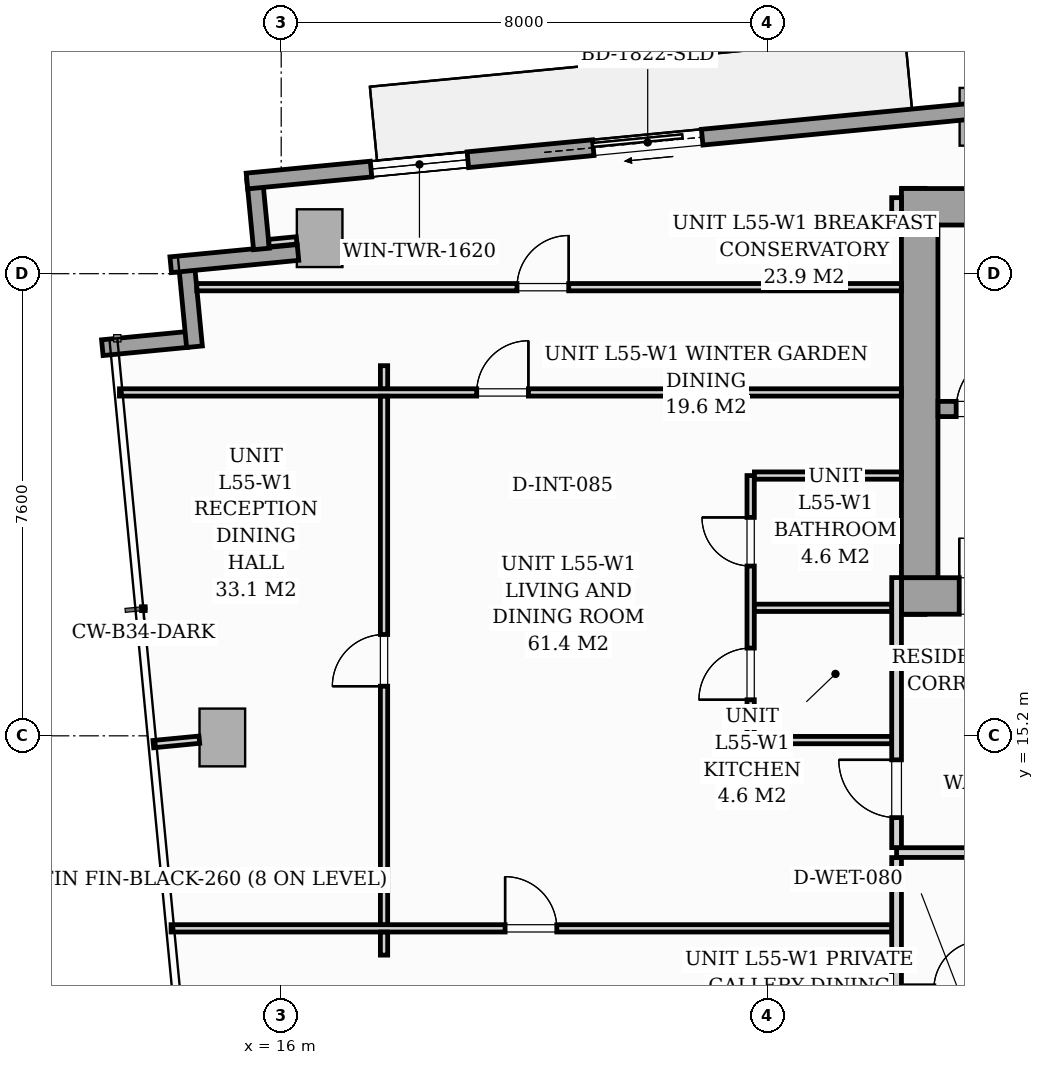
"""IFC4 building model, lengths in metres.
Left out: names, types, materials, properties, quantities, classifications, styles, units other than length and angle.
Written with IfcOpenShell. Run it as: python <this file> out.ifc"""

import sys

from ifc_helpers import new_model, si_unit, direction, frame, frame_2d, origin, origin_2d, place, context, subcontext, project, spatial, rectangle, i_section, extrude, source, transform, mapped, element, fill, save


model = new_model("IFC4")
c1 = context("Model", 3, precision=1e-05, world=origin(), true_north=direction((0.0, 1.0)))
c2 = subcontext(c1, "Body", "Model", "MODEL_VIEW")
j1 = project(units=[si_unit("LENGTHUNIT", "METRE"), si_unit("PLANEANGLEUNIT", "RADIAN")], contexts=[c1])
p1 = place(None, origin())
s1 = spatial("IfcSite", under=j1, at=p1, CompositionType="ELEMENT")
p2 = place(p1, origin())
s2 = spatial("IfcBuilding", under=s1, at=p2, CompositionType="ELEMENT")
p3 = place(p2, frame((0.0, 0.0, 192.2)))
s3 = spatial("IfcBuildingStorey", under=s2, at=p3, CompositionType="ELEMENT", Elevation=192.2)
m1 = source(origin(), c2, "Body", "SweptSolid", [
    extrude(i_section(OverallWidth=0.416, OverallDepth=0.446, WebThickness=0.039, FlangeThickness=0.063, FilletRadius=0.018, at=origin_2d()), origin(), (0.0, 0.0, 1.0), 3.196),
])
for number, where, z_axis, x_axis in (
    (1, (26.4, 17.4, 0.002), (0.0, 0.0, 1.0), (1.0, 0.0, 0.0)),
    (2, (26.4, 24.0, 0.002), (0.0, 0.0, 1.0), (1.0, 0.0, 0.0)),
):
    element("IfcColumn", number, at=place(p3, frame(where, z_axis=z_axis, x_axis=x_axis)), inside=s3, PredefinedType="PILASTER", context=c2, shape_type="MappedRepresentation", body=[
        mapped(m1, transform((0.0, 0.0, 0.0), scale=1.0)),
    ])
m2 = source(origin(), c2, "Body", "SweptSolid", [
    extrude(rectangle(XDim=0.75, YDim=0.95, at=origin_2d()), origin(), (0.0, 0.0, 1.0), 3.196),
])
for number, where, z_axis, x_axis in (
    (3, (16.632, 23.384, 0.002), (0.0, 0.0, 1.0), (0.995, 0.096, 0.0)),
    (4, (27.532, 25.38, 0.002), (0.0, 0.0, 1.0), (0.995, 0.096, 0.0)),
    (5, (15.032, 15.173, 0.002), (0.0, 0.0, 1.0), (0.995, 0.096, 0.0)),
):
    element("IfcColumn", number, at=place(p3, frame(where, z_axis=z_axis, x_axis=x_axis)), inside=s3, PredefinedType="COLUMN", context=c2, shape_type="MappedRepresentation", body=[
        mapped(m2, transform((0.0, 0.0, 0.0), scale=1.0)),
    ])
p4 = place(p3, frame((13.058, 21.583, 0.0), z_axis=(0.0, 0.0, 1.0), x_axis=(0.99540774648, 0.095725744959, 0.0)))
e6 = element("IfcWall", 6, at=p4, inside=s3, PredefinedType="STANDARD", context=c2, shape_type="SweptSolid", body=[
    extrude(rectangle(XDim=1.395, YDim=0.26, at=frame_2d((0.698, 0.0))), origin(), (0.0, 0.0, 1.0), 2.94),
])
p5 = place(p3, frame((14.574, 21.599, 0.0), z_axis=(0.0, 0.0, 1.0), x_axis=(-0.095742423056, 0.99540614245, 0.0)))
e7 = element("IfcWall", 7, at=p5, inside=s3, PredefinedType="STANDARD", context=c2, shape_type="SweptSolid", body=[
    extrude(rectangle(XDim=1.395, YDim=0.26, at=frame_2d((0.697, 0.0))), origin(), (0.0, 0.0, 1.0), 2.94),
])
p6 = place(p3, frame((14.183, 22.947, 0.0), z_axis=(0.0, 0.0, 1.0), x_axis=(0.995401580483, 0.095789840651, 0.0)))
e8 = element("IfcWall", 8, at=p6, inside=s3, PredefinedType="STANDARD", context=c2, shape_type="SweptSolid", body=[
    extrude(rectangle(XDim=2.103, YDim=0.26, at=frame_2d((1.051, 0.0))), origin(), (0.0, 0.0, 1.0), 2.94),
])
p7 = place(p3, frame((15.675, 23.207, 0.0), z_axis=(0.0, 0.0, 1.0), x_axis=(-0.095951054827, 0.995386053287, 0.0)))
e9 = element("IfcWall", 9, at=p7, inside=s3, PredefinedType="STANDARD", context=c2, shape_type="SweptSolid", body=[
    extrude(rectangle(XDim=1.15, YDim=0.26, at=frame_2d((0.575, 0.0))), origin(), (0.0, 0.0, 1.0), 2.94),
])
p8 = place(p3, frame((15.437, 24.324, 0.0), z_axis=(0.0, 0.0, 1.0), x_axis=(0.995395627913, 0.095851676732, 0.0)))
e10 = element("IfcWall", 10, at=p8, inside=s3, PredefinedType="STANDARD", context=c2, shape_type="SweptSolid", body=[
    extrude(rectangle(XDim=16.1, YDim=0.26, at=frame_2d((8.05, 0.0))), origin(), (0.0, 0.0, 1.0), 2.94),
])
p9 = place(p8, frame((5.721, 0.0, 0.0)))
e11 = element("IfcOpeningElement", 11, at=p9, cuts=e10, PredefinedType="OPENING", context=c2, shape_type="SweptSolid", body=[
    extrude(rectangle(XDim=1.8, YDim=2.06, at=frame_2d((0.9, 1.03))), frame((0.0, 0.14, 0.0), z_axis=(0.0, -1.0, 0.0), x_axis=(1.0, 0.0, 0.0)), (0.0, 0.0, 1.0), 0.28),
])
p10 = place(p8, frame((2.05, 0.0, 0.65)))
e12 = element("IfcOpeningElement", 12, at=p10, cuts=e10, PredefinedType="OPENING", context=c2, shape_type="SweptSolid", body=[
    extrude(rectangle(XDim=1.6, YDim=1.5, at=frame_2d((0.8, 0.75))), frame((0.0, 0.14, 0.0), z_axis=(0.0, -1.0, 0.0), x_axis=(1.0, 0.0, 0.0)), (0.0, 0.0, 1.0), 0.28),
])
p11 = place(p3, frame((26.2, 17.5, 0.0), z_axis=(0.0, 0.0, 1.0), x_axis=(1.0, 0.0, 0.0)))
e13 = element("IfcWall", 13, at=p11, inside=s3, PredefinedType="SHEAR", context=c2, shape_type="SweptSolid", body=[
    extrude(rectangle(XDim=19.6, YDim=0.6, at=frame_2d((9.8, 0.0))), origin(), (0.0, 0.0, 1.0), 3.2),
])
p12 = place(p11, frame((0.95, 0.0, 0.0)))
e14 = element("IfcOpeningElement", 14, at=p12, cuts=e13, PredefinedType="OPENING", context=c2, shape_type="SweptSolid", body=[
    extrude(rectangle(XDim=0.95, YDim=2.06, at=frame_2d((0.475, 1.03))), frame((0.0, 0.31, 0.0), z_axis=(0.0, -1.0, 0.0), x_axis=(1.0, 0.0, 0.0)), (0.0, 0.0, 1.0), 0.62),
])
p13 = place(p11, frame((9.38, 0.0, 0.0)))
e15 = element("IfcOpeningElement", 15, at=p13, cuts=e13, PredefinedType="OPENING", context=c2, shape_type="SweptSolid", body=[
    extrude(rectangle(XDim=0.85, YDim=2.0, at=frame_2d((0.425, 1.0))), frame((0.0, 0.31, 0.0), z_axis=(0.0, -1.0, 0.0), x_axis=(1.0, 0.0, 0.0)), (0.0, 0.0, 1.0), 0.62),
])
p14 = place(p11, frame((17.55, 0.0, 0.0)))
e16 = element("IfcOpeningElement", 16, at=p14, cuts=e13, PredefinedType="OPENING", context=c2, shape_type="SweptSolid", body=[
    extrude(rectangle(XDim=0.95, YDim=2.06, at=frame_2d((0.475, 1.03))), frame((0.0, 0.31, 0.0), z_axis=(0.0, -1.0, 0.0), x_axis=(1.0, 0.0, 0.0)), (0.0, 0.0, 1.0), 0.62),
])
p15 = place(p3, frame((26.2, 23.9, 0.0), z_axis=(0.0, 0.0, 1.0), x_axis=(1.0, 0.0, 0.0)))
e17 = element("IfcWall", 17, at=p15, inside=s3, PredefinedType="SHEAR", context=c2, shape_type="SweptSolid", body=[
    extrude(rectangle(XDim=19.6, YDim=0.6, at=frame_2d((9.8, 0.0))), origin(), (0.0, 0.0, 1.0), 3.2),
])
p16 = place(p3, frame((26.5, 17.802, 0.0), z_axis=(0.0, 0.0, 1.0), x_axis=(0.0, 1.0, 0.0)))
e18 = element("IfcWall", 18, at=p16, inside=s3, PredefinedType="SHEAR", context=c2, shape_type="SweptSolid", body=[
    extrude(rectangle(XDim=5.796, YDim=0.6, at=frame_2d((2.898, 0.0))), origin(), (0.0, 0.0, 1.0), 3.2),
])
p17 = place(p3, frame((26.802, 20.575, 0.0), z_axis=(0.0, 0.0, 1.0), x_axis=(1.0, 0.0, 0.0)))
e19 = element("IfcWall", 19, at=p17, inside=s3, PredefinedType="SOLIDWALL", context=c2, shape_type="SweptSolid", body=[
    extrude(rectangle(XDim=8.148, YDim=0.25, at=frame_2d((4.074, 0.0))), origin(), (0.0, 0.0, 1.0), 3.2),
])
p18 = place(p17, frame((0.298, 0.0, 0.0)))
e20 = element("IfcOpeningElement", 20, at=p18, cuts=e19, PredefinedType="OPENING", context=c2, shape_type="SweptSolid", body=[
    extrude(rectangle(XDim=0.95, YDim=2.06, at=frame_2d((0.475, 1.03))), frame((0.0, 0.135, 0.0), z_axis=(0.0, -1.0, 0.0), x_axis=(1.0, 0.0, 0.0)), (0.0, 0.0, 1.0), 0.27),
])
p19 = place(p3, frame((26.12, 13.28, 0.0), z_axis=(0.0, 0.0, 1.0), x_axis=(1.0, 0.0, 0.0)))
e21 = element("IfcWall", 21, at=p19, inside=s3, PredefinedType="PARTITIONING", context=c2, shape_type="SweptSolid", body=[
    extrude(rectangle(XDim=21.33, YDim=0.16, at=frame_2d((10.665, 0.0))), origin(), (0.0, 0.0, 1.0), 2.94),
])
p20 = place(p19, frame((4.704, 0.0, 0.0)))
e22 = element("IfcOpeningElement", 22, at=p20, cuts=e21, PredefinedType="OPENING", context=c2, shape_type="SweptSolid", body=[
    extrude(rectangle(XDim=0.95, YDim=2.06, at=frame_2d((0.475, 1.03))), frame((0.0, 0.09, 0.0), z_axis=(0.0, -1.0, 0.0), x_axis=(1.0, 0.0, 0.0)), (0.0, 0.0, 1.0), 0.18),
])
p21 = place(p19, frame((11.6, 0.0, 0.0)))
e23 = element("IfcOpeningElement", 23, at=p21, cuts=e21, PredefinedType="OPENING", context=c2, shape_type="SweptSolid", body=[
    extrude(rectangle(XDim=0.95, YDim=2.06, at=frame_2d((0.475, 1.03))), frame((0.0, 0.09, 0.0), z_axis=(0.0, -1.0, 0.0), x_axis=(1.0, 0.0, 0.0)), (0.0, 0.0, 1.0), 0.18),
])
p22 = place(p19, frame((14.976, 0.0, 0.0)))
e24 = element("IfcOpeningElement", 24, at=p22, cuts=e21, PredefinedType="OPENING", context=c2, shape_type="SweptSolid", body=[
    extrude(rectangle(XDim=0.95, YDim=2.06, at=frame_2d((0.475, 1.03))), frame((0.0, 0.09, 0.0), z_axis=(0.0, -1.0, 0.0), x_axis=(1.0, 0.0, 0.0)), (0.0, 0.0, 1.0), 0.18),
])
p23 = place(p3, frame((26.12, 7.261, 0.0), z_axis=(0.0, 0.0, 1.0), x_axis=(0.0, 1.0, 0.0)))
e25 = element("IfcWall", 25, at=p23, inside=s3, PredefinedType="PARTITIONING", context=c2, shape_type="SweptSolid", body=[
    extrude(rectangle(XDim=5.937, YDim=0.16, at=frame_2d((2.968, 0.0))), origin(), (0.0, 0.0, 1.0), 2.94),
])
p24 = place(p3, frame((26.12, 13.362, 0.0), z_axis=(0.0, 0.0, 1.0), x_axis=(0.0, 1.0, 0.0)))
e26 = element("IfcWall", 26, at=p24, inside=s3, PredefinedType="PARTITIONING", context=c2, shape_type="SweptSolid", body=[
    extrude(rectangle(XDim=4.44, YDim=0.16, at=frame_2d((2.22, 0.0))), origin(), (0.0, 0.0, 1.0), 2.94),
])
p25 = place(p24, frame((0.493, 0.0, 0.0)))
e27 = element("IfcOpeningElement", 27, at=p25, cuts=e26, PredefinedType="OPENING", context=c2, shape_type="SweptSolid", body=[
    extrude(rectangle(XDim=0.95, YDim=2.06, at=frame_2d((0.475, 1.03))), frame((0.0, 0.09, 0.0), z_axis=(0.0, -1.0, 0.0), x_axis=(1.0, 0.0, 0.0)), (0.0, 0.0, 1.0), 0.18),
])
p26 = place(p3, frame((26.12, 23.598, 0.0), z_axis=(0.0, 0.0, 1.0), x_axis=(0.0, 1.0, 0.0)))
e28 = element("IfcWall", 28, at=p26, inside=s3, PredefinedType="PARTITIONING", context=c2, shape_type="SweptSolid", body=[
    extrude(rectangle(XDim=0.452, YDim=0.16, at=frame_2d((0.226, 0.0))), origin(), (0.0, 0.0, 1.0), 2.94),
])
p27 = place(p3, frame((23.72, 15.13, 0.0), z_axis=(0.0, 0.0, 1.0), x_axis=(0.0, 1.0, 0.0)))
e29 = element("IfcWall", 29, at=p27, inside=s3, PredefinedType="PARTITIONING", context=c2, shape_type="SweptSolid", body=[
    extrude(rectangle(XDim=4.35, YDim=0.12, at=frame_2d((2.175, 0.0))), origin(), (0.0, 0.0, 1.0), 2.94),
])
p28 = place(p27, frame((0.663, 0.0, 0.0)))
e30 = element("IfcOpeningElement", 30, at=p28, cuts=e29, PredefinedType="OPENING", context=c2, shape_type="SweptSolid", body=[
    extrude(rectangle(XDim=0.85, YDim=2.05, at=frame_2d((0.425, 1.025))), frame((0.0, 0.07, 0.0), z_axis=(0.0, -1.0, 0.0), x_axis=(1.0, 0.0, 0.0)), (0.0, 0.0, 1.0), 0.14),
])
p29 = place(p27, frame((2.862, 0.0, 0.0)))
e31 = element("IfcOpeningElement", 31, at=p29, cuts=e29, PredefinedType="OPENING", context=c2, shape_type="SweptSolid", body=[
    extrude(rectangle(XDim=0.8, YDim=2.02, at=frame_2d((0.4, 1.01))), frame((0.0, 0.07, 0.0), z_axis=(0.0, -1.0, 0.0), x_axis=(1.0, 0.0, 0.0)), (0.0, 0.0, 1.0), 0.14),
])
p30 = place(p3, frame((23.782, 17.305, 0.0), z_axis=(0.0, 0.0, 1.0), x_axis=(1.0, 0.0, 0.0)))
e32 = element("IfcWall", 32, at=p30, inside=s3, PredefinedType="PARTITIONING", context=c2, shape_type="SweptSolid", body=[
    extrude(rectangle(XDim=2.256, YDim=0.12, at=frame_2d((1.128, 0.0))), origin(), (0.0, 0.0, 1.0), 2.281),
])
p31 = place(p3, frame((23.782, 15.13, 0.0), z_axis=(0.0, 0.0, 1.0), x_axis=(1.0, 0.0, 0.0)))
e33 = element("IfcWall", 33, at=p31, inside=s3, PredefinedType="PARTITIONING", context=c2, shape_type="SweptSolid", body=[
    extrude(rectangle(XDim=2.256, YDim=0.12, at=frame_2d((1.128, 0.0))), origin(), (0.0, 0.0, 1.0), 2.94),
])
p32 = place(p3, frame((23.782, 19.48, 0.0), z_axis=(0.0, 0.0, 1.0), x_axis=(1.0, 0.0, 0.0)))
e34 = element("IfcWall", 34, at=p32, inside=s3, PredefinedType="PARTITIONING", context=c2, shape_type="SweptSolid", body=[
    extrude(rectangle(XDim=2.416, YDim=0.12, at=frame_2d((1.208, 0.0))), origin(), (0.0, 0.0, 1.0), 2.94),
])
p33 = place(p3, frame((14.612, 22.578, 0.0), z_axis=(0.0, 0.0, 1.0), x_axis=(1.0, 0.0, 0.0)))
e35 = element("IfcWall", 35, at=p33, inside=s3, PredefinedType="PARTITIONING", context=c2, shape_type="SweptSolid", body=[
    extrude(rectangle(XDim=11.586, YDim=0.12, at=frame_2d((5.793, 0.0))), origin(), (0.0, 0.0, 1.0), 2.94),
])
p34 = place(p33, frame((5.266, 0.0, 0.0)))
e36 = element("IfcOpeningElement", 36, at=p34, cuts=e35, PredefinedType="OPENING", context=c2, shape_type="SweptSolid", body=[
    extrude(rectangle(XDim=0.85, YDim=2.05, at=frame_2d((0.425, 1.025))), frame((0.0, 0.07, 0.0), z_axis=(0.0, -1.0, 0.0), x_axis=(1.0, 0.0, 0.0)), (0.0, 0.0, 1.0), 0.14),
])
p35 = place(p3, frame((14.189, 12.034, 0.0), z_axis=(0.0, 0.0, 1.0), x_axis=(1.0, 0.0, 0.0)))
e37 = element("IfcWall", 37, at=p35, inside=s3, PredefinedType="PARTITIONING", context=c2, shape_type="SweptSolid", body=[
    extrude(rectangle(XDim=11.849, YDim=0.12, at=frame_2d((5.925, 0.0))), origin(), (0.0, 0.0, 1.0), 2.94),
])
p36 = place(p35, frame((5.493, 0.0, 0.0)))
e38 = element("IfcOpeningElement", 38, at=p36, cuts=e37, PredefinedType="OPENING", context=c2, shape_type="SweptSolid", body=[
    extrude(rectangle(XDim=0.85, YDim=2.05, at=frame_2d((0.425, 1.025))), frame((0.0, 0.07, 0.0), z_axis=(0.0, -1.0, 0.0), x_axis=(1.0, 0.0, 0.0)), (0.0, 0.0, 1.0), 0.14),
])
p37 = place(p3, frame((13.34, 20.847, 0.0), z_axis=(0.0, 0.0, 1.0), x_axis=(1.0, 0.0, 0.0)))
e39 = element("IfcWall", 39, at=p37, inside=s3, PredefinedType="PARTITIONING", context=c2, shape_type="SweptSolid", body=[
    extrude(rectangle(XDim=12.858, YDim=0.12, at=frame_2d((6.429, 0.0))), origin(), (0.0, 0.0, 1.0), 2.94),
])
p38 = place(p37, frame((5.875, 0.0, 0.0)))
e40 = element("IfcOpeningElement", 40, at=p38, cuts=e39, PredefinedType="OPENING", context=c2, shape_type="SweptSolid", body=[
    extrude(rectangle(XDim=0.85, YDim=2.05, at=frame_2d((0.425, 1.025))), frame((0.0, 0.07, 0.0), z_axis=(0.0, -1.0, 0.0), x_axis=(1.0, 0.0, 0.0)), (0.0, 0.0, 1.0), 0.14),
])
p39 = place(p3, frame((17.691, 11.594, 0.0), z_axis=(0.0, 0.0, 1.0), x_axis=(0.0, 1.0, 0.0)))
e41 = element("IfcWall", 41, at=p39, inside=s3, PredefinedType="PARTITIONING", context=c2, shape_type="SweptSolid", body=[
    extrude(rectangle(XDim=0.378, YDim=0.12, at=frame_2d((0.189, 0.0))), origin(), (0.0, 0.0, 1.0), 2.94),
])
p40 = place(p3, frame((17.691, 12.096, 0.0), z_axis=(0.0, 0.0, 1.0), x_axis=(0.0, 1.0, 0.0)))
e42 = element("IfcWall", 42, at=p40, inside=s3, PredefinedType="PARTITIONING", context=c2, shape_type="SweptSolid", body=[
    extrude(rectangle(XDim=8.689, YDim=0.12, at=frame_2d((4.344, 0.0))), origin(), (0.0, 0.0, 1.0), 2.94),
])
p41 = place(p40, frame((3.92, 0.0, 0.0)))
e43 = element("IfcOpeningElement", 43, at=p41, cuts=e42, PredefinedType="OPENING", context=c2, shape_type="SweptSolid", body=[
    extrude(rectangle(XDim=0.85, YDim=2.05, at=frame_2d((0.425, 1.025))), frame((0.0, 0.07, 0.0), z_axis=(0.0, -1.0, 0.0), x_axis=(1.0, 0.0, 0.0)), (0.0, 0.0, 1.0), 0.14),
])
p42 = place(p3, frame((17.691, 20.909, 0.0), z_axis=(0.0, 0.0, 1.0), x_axis=(0.0, 1.0, 0.0)))
e44 = element("IfcWall", 44, at=p42, inside=s3, PredefinedType="PARTITIONING", context=c2, shape_type="SweptSolid", body=[
    extrude(rectangle(XDim=0.378, YDim=0.12, at=frame_2d((0.189, 0.0))), origin(), (0.0, 0.0, 1.0), 2.94),
])
p43 = place(p3, frame((16.254, 23.348, 0.0), z_axis=(0.0, 0.0, 1.0), x_axis=(-0.995389482415, -0.095915474751, 0.0)))
e45 = element("IfcWall", 45, at=p43, inside=s3, PredefinedType="PARTITIONING", context=c2, shape_type="SweptSolid", body=[
    extrude(rectangle(XDim=0.458, YDim=0.12, at=frame_2d((0.229, 0.0))), origin(), (0.0, 0.0, 1.0), 2.94),
])
p44 = place(p3, frame((14.654, 15.136, 0.0), z_axis=(0.0, 0.0, 1.0), x_axis=(-0.995408440582, -0.095718527039, 0.0)))
e46 = element("IfcWall", 46, at=p44, inside=s3, PredefinedType="PARTITIONING", context=c2, shape_type="SweptSolid", body=[
    extrude(rectangle(XDim=0.76, YDim=0.12, at=frame_2d((0.38, 0.0))), origin(), (0.0, 0.0, 1.0), 2.94),
])
m3 = source(origin(), c2, "Body", "SweptSolid", [
    extrude(rectangle(XDim=1.8, YDim=2.06, at=frame_2d((0.9, 1.03))), frame((0.0, 0.025, 0.0), z_axis=(0.0, -1.0, 0.0), x_axis=(1.0, 0.0, 0.0)), (0.0, 0.0, 1.0), 0.05),
])
p45 = place(p9, origin())
e47 = element("IfcDoor", 47, at=p45, inside=s3, OperationType="SLIDING_TO_LEFT", PredefinedType="DOOR", context=c2, shape_type="MappedRepresentation", body=[
    mapped(m3, transform((0.0, 0.0, 0.0), scale=1.0)),
])
fill(e11, e47)
m4 = source(origin(), c2, "Body", "SweptSolid", [
    extrude(rectangle(XDim=1.6, YDim=1.5, at=frame_2d((0.8, 0.75))), frame((0.0, 0.03, 0.0), z_axis=(0.0, -1.0, 0.0), x_axis=(1.0, 0.0, 0.0)), (0.0, 0.0, 1.0), 0.06),
])
p46 = place(p10, origin())
e48 = element("IfcWindow", 48, at=p46, inside=s3, PartitioningType="SINGLE_PANEL", PredefinedType="WINDOW", context=c2, shape_type="MappedRepresentation", body=[
    mapped(m4, transform((0.0, 0.0, 0.0), scale=1.0)),
])
fill(e12, e48)
m5 = source(origin(), c2, "Body", "SweptSolid", [
    extrude(rectangle(XDim=0.95, YDim=2.06, at=frame_2d((0.475, 1.03))), frame((0.0, 0.025, 0.0), z_axis=(0.0, -1.0, 0.0), x_axis=(1.0, 0.0, 0.0)), (0.0, 0.0, 1.0), 0.05),
])
p47 = place(p12, origin())
e49 = element("IfcDoor", 49, at=p47, inside=s3, OperationType="SINGLE_SWING_LEFT", PredefinedType="DOOR", context=c2, shape_type="MappedRepresentation", body=[
    mapped(m5, transform((0.0, 0.0, 0.0), scale=1.0)),
])
fill(e14, e49)
p48 = place(p18, origin())
e50 = element("IfcDoor", 50, at=p48, inside=s3, OperationType="SINGLE_SWING_RIGHT", PredefinedType="DOOR", context=c2, shape_type="MappedRepresentation", body=[
    mapped(m5, transform((0.0, 0.0, 0.0), scale=1.0)),
])
fill(e20, e50)
m6 = source(origin(), c2, "Body", "SweptSolid", [
    extrude(rectangle(XDim=0.95, YDim=2.06, at=frame_2d((0.475, 1.03))), frame((0.0, 0.025, 0.0), z_axis=(0.0, -1.0, 0.0), x_axis=(1.0, 0.0, 0.0)), (0.0, 0.0, 1.0), 0.05),
])
p49 = place(p25, origin())
e51 = element("IfcDoor", 51, at=p49, inside=s3, OperationType="SINGLE_SWING_RIGHT", PredefinedType="DOOR", context=c2, shape_type="MappedRepresentation", body=[
    mapped(m6, transform((0.0, 0.0, 0.0), scale=1.0)),
])
fill(e27, e51)
m7 = source(origin(), c2, "Body", "SweptSolid", [
    extrude(rectangle(XDim=0.85, YDim=2.05, at=frame_2d((0.425, 1.025))), frame((0.0, 0.025, 0.0), z_axis=(0.0, -1.0, 0.0), x_axis=(1.0, 0.0, 0.0)), (0.0, 0.0, 1.0), 0.05),
])
p50 = place(p28, origin())
e52 = element("IfcDoor", 52, at=p50, inside=s3, OperationType="SINGLE_SWING_LEFT", PredefinedType="DOOR", context=c2, shape_type="MappedRepresentation", body=[
    mapped(m7, transform((0.0, 0.0, 0.0), scale=1.0)),
])
fill(e30, e52)
m8 = source(origin(), c2, "Body", "SweptSolid", [
    extrude(rectangle(XDim=0.8, YDim=2.02, at=frame_2d((0.4, 1.01))), frame((0.0, 0.025, 0.0), z_axis=(0.0, -1.0, 0.0), x_axis=(1.0, 0.0, 0.0)), (0.0, 0.0, 1.0), 0.05),
])
p51 = place(p29, origin())
e53 = element("IfcDoor", 53, at=p51, inside=s3, OperationType="SINGLE_SWING_RIGHT", PredefinedType="DOOR", context=c2, shape_type="MappedRepresentation", body=[
    mapped(m8, transform((0.0, 0.0, 0.0), scale=1.0)),
])
fill(e31, e53)
p52 = place(p34, origin())
e54 = element("IfcDoor", 54, at=p52, inside=s3, OperationType="SINGLE_SWING_RIGHT", PredefinedType="DOOR", context=c2, shape_type="MappedRepresentation", body=[
    mapped(m7, transform((0.0, 0.0, 0.0), scale=1.0)),
])
fill(e36, e54)
p53 = place(p36, origin())
e55 = element("IfcDoor", 55, at=p53, inside=s3, OperationType="SINGLE_SWING_LEFT", PredefinedType="DOOR", context=c2, shape_type="MappedRepresentation", body=[
    mapped(m7, transform((0.0, 0.0, 0.0), scale=1.0)),
])
fill(e38, e55)
p54 = place(p38, origin())
e56 = element("IfcDoor", 56, at=p54, inside=s3, OperationType="SINGLE_SWING_RIGHT", PredefinedType="DOOR", context=c2, shape_type="MappedRepresentation", body=[
    mapped(m7, transform((0.0, 0.0, 0.0), scale=1.0)),
])
fill(e40, e56)
p55 = place(p41, origin())
e57 = element("IfcDoor", 57, at=p55, inside=s3, OperationType="SINGLE_SWING_LEFT", PredefinedType="DOOR", context=c2, shape_type="MappedRepresentation", body=[
    mapped(m7, transform((0.0, 0.0, 0.0), scale=1.0)),
])
fill(e43, e57)
save(model, sys.argv[1])
